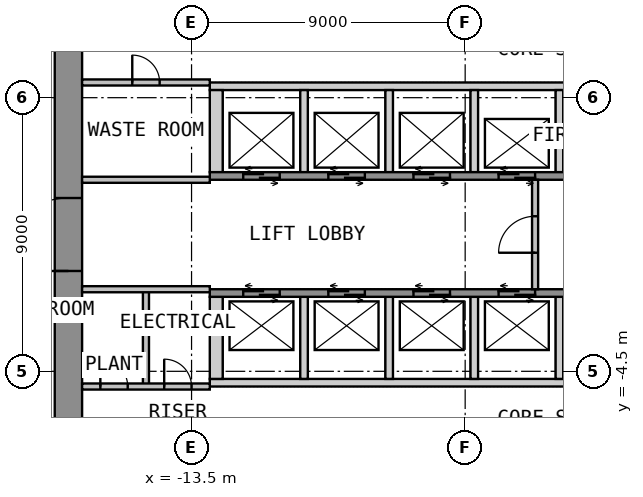
"""IFC4 building model, lengths in metres.
Left out: names, types, materials, properties, quantities, classifications, styles, units other than length and angle.
Written with IfcOpenShell. Run it as: python <this file> out.ifc"""

import sys

from ifc_helpers import new_model, si_unit, direction, frame, frame_2d, origin, place, context, subcontext, project, spatial, polyline, rectangle, outline, extrude, element, fill, save


model = new_model("IFC4")
c1 = context("Model", 3, precision=1e-05, world=origin(), true_north=direction((0.0, 1.0)))
c2 = subcontext(c1, "Body", "Model", "MODEL_VIEW")
j1 = project(units=[si_unit("LENGTHUNIT", "METRE"), si_unit("PLANEANGLEUNIT", "RADIAN")], contexts=[c1])
p1 = place(None, origin())
s1 = spatial("IfcSite", under=j1, at=p1, CompositionType="ELEMENT")
p2 = place(p1, origin())
s2 = spatial("IfcBuilding", under=s1, at=p2, CompositionType="ELEMENT")
p3 = place(p2, origin())
s3 = spatial("IfcBuildingStorey", under=s2, at=p3, CompositionType="ELEMENT", Elevation=0.0)
p4 = place(p3, frame((-17.55, -12.6, 0.0), z_axis=(0.0, 0.0, 1.0), x_axis=(0.0, 1.0, 0.0)))
e1 = element("IfcWall", 1, at=p4, inside=s3, PredefinedType="SHEAR", context=c2, shape_type="SweptSolid", body=[
    extrude(rectangle(XDim=25.2, YDim=0.9, at=frame_2d((12.6, 0.0))), origin(), (0.0, 0.0, 1.0), 5.6),
])
p5 = place(p4, frame((11.4, 0.0, 0.0)))
e2 = element("IfcOpeningElement", 2, at=p5, cuts=e1, PredefinedType="OPENING", context=c2, shape_type="SweptSolid", body=[
    extrude(rectangle(XDim=2.4, YDim=2.1, at=frame_2d((1.2, 1.05))), frame((0.0, 0.46, 0.0), z_axis=(0.0, -1.0, 0.0), x_axis=(1.0, 0.0, 0.0)), (0.0, 0.0, 1.0), 0.92),
])
p6 = place(p3, origin())
e3 = element("IfcWall", 3, at=p6, inside=s3, PredefinedType="SHEAR", context=c2, shape_type="SweptSolid", body=[
    extrude(outline(polyline([(-12.9, 4.75), (12.9, 4.75), (12.9, 5.0), (-12.9, 5.0), (-12.9, 4.75)])), origin(), (0.0, 0.0, 1.0), 5.6),
])
p7 = place(p3, origin())
e4 = element("IfcWall", 4, at=p7, inside=s3, PredefinedType="SHEAR", context=c2, shape_type="SweptSolid", body=[
    extrude(outline(polyline([(-12.9, 2.05), (-12.475, 2.05), (-12.475, 4.75), (-12.9, 4.75), (-12.9, 2.05)])), origin(), (0.0, 0.0, 1.0), 5.6),
])
p8 = place(p3, origin())
e5 = element("IfcWall", 5, at=p8, inside=s3, PredefinedType="SHEAR", context=c2, shape_type="SweptSolid", body=[
    extrude(outline(polyline([(-9.925, 2.05), (-9.675, 2.05), (-9.675, 4.75), (-9.925, 4.75), (-9.925, 2.05)])), origin(), (0.0, 0.0, 1.0), 5.6),
])
p9 = place(p3, origin())
e6 = element("IfcWall", 6, at=p9, inside=s3, PredefinedType="SHEAR", context=c2, shape_type="SweptSolid", body=[
    extrude(outline(polyline([(-7.125, 2.05), (-6.875, 2.05), (-6.875, 4.75), (-7.125, 4.75), (-7.125, 2.05)])), origin(), (0.0, 0.0, 1.0), 5.6),
])
p10 = place(p3, origin())
e7 = element("IfcWall", 7, at=p10, inside=s3, PredefinedType="SHEAR", context=c2, shape_type="SweptSolid", body=[
    extrude(outline(polyline([(-4.325, 2.05), (-4.075, 2.05), (-4.075, 4.75), (-4.325, 4.75), (-4.325, 2.05)])), origin(), (0.0, 0.0, 1.0), 5.6),
])
p11 = place(p3, origin())
e8 = element("IfcWall", 8, at=p11, inside=s3, PredefinedType="SHEAR", context=c2, shape_type="SweptSolid", body=[
    extrude(outline(polyline([(-1.525, 2.05), (-1.275, 2.05), (-1.275, 4.75), (-1.525, 4.75), (-1.525, 2.05)])), origin(), (0.0, 0.0, 1.0), 5.6),
])
p12 = place(p3, frame((-12.9, 1.925, 0.0), z_axis=(0.0, 0.0, 1.0), x_axis=(1.0, 0.0, 0.0)))
e9 = element("IfcWall", 9, at=p12, inside=s3, PredefinedType="SHEAR", context=c2, shape_type="SweptSolid", body=[
    extrude(rectangle(XDim=25.8, YDim=0.25, at=frame_2d((12.9, 0.0))), origin(), (0.0, 0.0, 1.0), 5.6),
])
p13 = place(p12, frame((1.1, 0.0, 0.0)))
e10 = element("IfcOpeningElement", 10, at=p13, cuts=e9, PredefinedType="OPENING", context=c2, shape_type="SweptSolid", body=[
    extrude(rectangle(XDim=1.2, YDim=2.1, at=frame_2d((0.6, 1.05))), frame((0.0, 0.135, 0.0), z_axis=(0.0, -1.0, 0.0), x_axis=(1.0, 0.0, 0.0)), (0.0, 0.0, 1.0), 0.27),
])
p14 = place(p12, frame((3.9, 0.0, 0.0)))
e11 = element("IfcOpeningElement", 11, at=p14, cuts=e9, PredefinedType="OPENING", context=c2, shape_type="SweptSolid", body=[
    extrude(rectangle(XDim=1.2, YDim=2.1, at=frame_2d((0.6, 1.05))), frame((0.0, 0.135, 0.0), z_axis=(0.0, -1.0, 0.0), x_axis=(1.0, 0.0, 0.0)), (0.0, 0.0, 1.0), 0.27),
])
p15 = place(p12, frame((6.7, 0.0, 0.0)))
e12 = element("IfcOpeningElement", 12, at=p15, cuts=e9, PredefinedType="OPENING", context=c2, shape_type="SweptSolid", body=[
    extrude(rectangle(XDim=1.2, YDim=2.1, at=frame_2d((0.6, 1.05))), frame((0.0, 0.135, 0.0), z_axis=(0.0, -1.0, 0.0), x_axis=(1.0, 0.0, 0.0)), (0.0, 0.0, 1.0), 0.27),
])
p16 = place(p12, frame((9.5, 0.0, 0.0)))
e13 = element("IfcOpeningElement", 13, at=p16, cuts=e9, PredefinedType="OPENING", context=c2, shape_type="SweptSolid", body=[
    extrude(rectangle(XDim=1.2, YDim=2.1, at=frame_2d((0.6, 1.05))), frame((0.0, 0.135, 0.0), z_axis=(0.0, -1.0, 0.0), x_axis=(1.0, 0.0, 0.0)), (0.0, 0.0, 1.0), 0.27),
])
p17 = place(p12, frame((12.3, 0.0, 0.0)))
e14 = element("IfcOpeningElement", 14, at=p17, cuts=e9, PredefinedType="OPENING", context=c2, shape_type="SweptSolid", body=[
    extrude(rectangle(XDim=1.2, YDim=2.1, at=frame_2d((0.6, 1.05))), frame((0.0, 0.135, 0.0), z_axis=(0.0, -1.0, 0.0), x_axis=(1.0, 0.0, 0.0)), (0.0, 0.0, 1.0), 0.27),
])
p18 = place(p12, frame((15.1, 0.0, 0.0)))
e15 = element("IfcOpeningElement", 15, at=p18, cuts=e9, PredefinedType="OPENING", context=c2, shape_type="SweptSolid", body=[
    extrude(rectangle(XDim=1.2, YDim=2.1, at=frame_2d((0.6, 1.05))), frame((0.0, 0.135, 0.0), z_axis=(0.0, -1.0, 0.0), x_axis=(1.0, 0.0, 0.0)), (0.0, 0.0, 1.0), 0.27),
])
p19 = place(p12, frame((17.9, 0.0, 0.0)))
e16 = element("IfcOpeningElement", 16, at=p19, cuts=e9, PredefinedType="OPENING", context=c2, shape_type="SweptSolid", body=[
    extrude(rectangle(XDim=1.2, YDim=2.1, at=frame_2d((0.6, 1.05))), frame((0.0, 0.135, 0.0), z_axis=(0.0, -1.0, 0.0), x_axis=(1.0, 0.0, 0.0)), (0.0, 0.0, 1.0), 0.27),
])
p20 = place(p12, frame((20.7, 0.0, 0.0)))
e17 = element("IfcOpeningElement", 17, at=p20, cuts=e9, PredefinedType="OPENING", context=c2, shape_type="SweptSolid", body=[
    extrude(rectangle(XDim=1.2, YDim=2.1, at=frame_2d((0.6, 1.05))), frame((0.0, 0.135, 0.0), z_axis=(0.0, -1.0, 0.0), x_axis=(1.0, 0.0, 0.0)), (0.0, 0.0, 1.0), 0.27),
])
p21 = place(p12, frame((23.5, 0.0, 0.0)))
e18 = element("IfcOpeningElement", 18, at=p21, cuts=e9, PredefinedType="OPENING", context=c2, shape_type="SweptSolid", body=[
    extrude(rectangle(XDim=1.2, YDim=2.1, at=frame_2d((0.6, 1.05))), frame((0.0, 0.135, 0.0), z_axis=(0.0, -1.0, 0.0), x_axis=(1.0, 0.0, 0.0)), (0.0, 0.0, 1.0), 0.27),
])
p22 = place(p3, origin())
e19 = element("IfcWall", 19, at=p22, inside=s3, PredefinedType="SHEAR", context=c2, shape_type="SweptSolid", body=[
    extrude(outline(polyline([(-12.9, -5.0), (12.9, -5.0), (12.9, -4.75), (-12.9, -4.75), (-12.9, -5.0)])), origin(), (0.0, 0.0, 1.0), 5.6),
])
p23 = place(p3, origin())
e20 = element("IfcWall", 20, at=p23, inside=s3, PredefinedType="SHEAR", context=c2, shape_type="SweptSolid", body=[
    extrude(outline(polyline([(-12.9, -4.75), (-12.475, -4.75), (-12.475, -2.05), (-12.9, -2.05), (-12.9, -4.75)])), origin(), (0.0, 0.0, 1.0), 5.6),
])
p24 = place(p3, origin())
e21 = element("IfcWall", 21, at=p24, inside=s3, PredefinedType="SHEAR", context=c2, shape_type="SweptSolid", body=[
    extrude(outline(polyline([(-9.925, -4.75), (-9.675, -4.75), (-9.675, -2.05), (-9.925, -2.05), (-9.925, -4.75)])), origin(), (0.0, 0.0, 1.0), 5.6),
])
p25 = place(p3, origin())
e22 = element("IfcWall", 22, at=p25, inside=s3, PredefinedType="SHEAR", context=c2, shape_type="SweptSolid", body=[
    extrude(outline(polyline([(-7.125, -4.75), (-6.875, -4.75), (-6.875, -2.05), (-7.125, -2.05), (-7.125, -4.75)])), origin(), (0.0, 0.0, 1.0), 5.6),
])
p26 = place(p3, origin())
e23 = element("IfcWall", 23, at=p26, inside=s3, PredefinedType="SHEAR", context=c2, shape_type="SweptSolid", body=[
    extrude(outline(polyline([(-4.325, -4.75), (-4.075, -4.75), (-4.075, -2.05), (-4.325, -2.05), (-4.325, -4.75)])), origin(), (0.0, 0.0, 1.0), 5.6),
])
p27 = place(p3, origin())
e24 = element("IfcWall", 24, at=p27, inside=s3, PredefinedType="SHEAR", context=c2, shape_type="SweptSolid", body=[
    extrude(outline(polyline([(-1.525, -4.75), (-1.275, -4.75), (-1.275, -2.05), (-1.525, -2.05), (-1.525, -4.75)])), origin(), (0.0, 0.0, 1.0), 5.6),
])
p28 = place(p3, frame((-12.9, -1.925, 0.0), z_axis=(0.0, 0.0, 1.0), x_axis=(1.0, 0.0, 0.0)))
e25 = element("IfcWall", 25, at=p28, inside=s3, PredefinedType="SHEAR", context=c2, shape_type="SweptSolid", body=[
    extrude(rectangle(XDim=25.8, YDim=0.25, at=frame_2d((12.9, 0.0))), origin(), (0.0, 0.0, 1.0), 5.6),
])
p29 = place(p28, frame((1.1, 0.0, 0.0)))
e26 = element("IfcOpeningElement", 26, at=p29, cuts=e25, PredefinedType="OPENING", context=c2, shape_type="SweptSolid", body=[
    extrude(rectangle(XDim=1.2, YDim=2.1, at=frame_2d((0.6, 1.05))), frame((0.0, 0.135, 0.0), z_axis=(0.0, -1.0, 0.0), x_axis=(1.0, 0.0, 0.0)), (0.0, 0.0, 1.0), 0.27),
])
p30 = place(p28, frame((3.9, 0.0, 0.0)))
e27 = element("IfcOpeningElement", 27, at=p30, cuts=e25, PredefinedType="OPENING", context=c2, shape_type="SweptSolid", body=[
    extrude(rectangle(XDim=1.2, YDim=2.1, at=frame_2d((0.6, 1.05))), frame((0.0, 0.135, 0.0), z_axis=(0.0, -1.0, 0.0), x_axis=(1.0, 0.0, 0.0)), (0.0, 0.0, 1.0), 0.27),
])
p31 = place(p28, frame((6.7, 0.0, 0.0)))
e28 = element("IfcOpeningElement", 28, at=p31, cuts=e25, PredefinedType="OPENING", context=c2, shape_type="SweptSolid", body=[
    extrude(rectangle(XDim=1.2, YDim=2.1, at=frame_2d((0.6, 1.05))), frame((0.0, 0.135, 0.0), z_axis=(0.0, -1.0, 0.0), x_axis=(1.0, 0.0, 0.0)), (0.0, 0.0, 1.0), 0.27),
])
p32 = place(p28, frame((9.5, 0.0, 0.0)))
e29 = element("IfcOpeningElement", 29, at=p32, cuts=e25, PredefinedType="OPENING", context=c2, shape_type="SweptSolid", body=[
    extrude(rectangle(XDim=1.2, YDim=2.1, at=frame_2d((0.6, 1.05))), frame((0.0, 0.135, 0.0), z_axis=(0.0, -1.0, 0.0), x_axis=(1.0, 0.0, 0.0)), (0.0, 0.0, 1.0), 0.27),
])
p33 = place(p28, frame((12.3, 0.0, 0.0)))
e30 = element("IfcOpeningElement", 30, at=p33, cuts=e25, PredefinedType="OPENING", context=c2, shape_type="SweptSolid", body=[
    extrude(rectangle(XDim=1.2, YDim=2.1, at=frame_2d((0.6, 1.05))), frame((0.0, 0.135, 0.0), z_axis=(0.0, -1.0, 0.0), x_axis=(1.0, 0.0, 0.0)), (0.0, 0.0, 1.0), 0.27),
])
p34 = place(p28, frame((15.1, 0.0, 0.0)))
e31 = element("IfcOpeningElement", 31, at=p34, cuts=e25, PredefinedType="OPENING", context=c2, shape_type="SweptSolid", body=[
    extrude(rectangle(XDim=1.2, YDim=2.1, at=frame_2d((0.6, 1.05))), frame((0.0, 0.135, 0.0), z_axis=(0.0, -1.0, 0.0), x_axis=(1.0, 0.0, 0.0)), (0.0, 0.0, 1.0), 0.27),
])
p35 = place(p28, frame((17.9, 0.0, 0.0)))
e32 = element("IfcOpeningElement", 32, at=p35, cuts=e25, PredefinedType="OPENING", context=c2, shape_type="SweptSolid", body=[
    extrude(rectangle(XDim=1.2, YDim=2.1, at=frame_2d((0.6, 1.05))), frame((0.0, 0.135, 0.0), z_axis=(0.0, -1.0, 0.0), x_axis=(1.0, 0.0, 0.0)), (0.0, 0.0, 1.0), 0.27),
])
p36 = place(p28, frame((20.7, 0.0, 0.0)))
e33 = element("IfcOpeningElement", 33, at=p36, cuts=e25, PredefinedType="OPENING", context=c2, shape_type="SweptSolid", body=[
    extrude(rectangle(XDim=1.2, YDim=2.1, at=frame_2d((0.6, 1.05))), frame((0.0, 0.135, 0.0), z_axis=(0.0, -1.0, 0.0), x_axis=(1.0, 0.0, 0.0)), (0.0, 0.0, 1.0), 0.27),
])
p37 = place(p28, frame((23.5, 0.0, 0.0)))
e34 = element("IfcOpeningElement", 34, at=p37, cuts=e25, PredefinedType="OPENING", context=c2, shape_type="SweptSolid", body=[
    extrude(rectangle(XDim=1.2, YDim=2.1, at=frame_2d((0.6, 1.05))), frame((0.0, 0.135, 0.0), z_axis=(0.0, -1.0, 0.0), x_axis=(1.0, 0.0, 0.0)), (0.0, 0.0, 1.0), 0.27),
])
p38 = place(p3, frame((-2.2, -1.8, 0.0), z_axis=(0.0, 0.0, 1.0), x_axis=(0.0, 1.0, 0.0)))
e35 = element("IfcWall", 35, at=p38, inside=s3, PredefinedType="PARTITIONING", context=c2, shape_type="SweptSolid", body=[
    extrude(rectangle(XDim=3.6, YDim=0.2, at=frame_2d((1.8, 0.0))), origin(), (0.0, 0.0, 1.0), 5.6),
])
p39 = place(p38, frame((1.2, 0.0, 0.0)))
e36 = element("IfcOpeningElement", 36, at=p39, cuts=e35, PredefinedType="OPENING", context=c2, shape_type="SweptSolid", body=[
    extrude(rectangle(XDim=1.2, YDim=2.1, at=frame_2d((0.6, 1.05))), frame((0.0, 0.11, 0.0), z_axis=(0.0, -1.0, 0.0), x_axis=(1.0, 0.0, 0.0)), (0.0, 0.0, 1.0), 0.22),
])
p40 = place(p3, frame((-17.1, 5.0, 0.0), z_axis=(0.0, 0.0, 1.0), x_axis=(1.0, 0.0, 0.0)))
e37 = element("IfcWall", 37, at=p40, inside=s3, PredefinedType="PARTITIONING", context=c2, shape_type="SweptSolid", body=[
    extrude(rectangle(XDim=4.2, YDim=0.2, at=frame_2d((2.1, 0.0))), origin(), (0.0, 0.0, 1.0), 5.6),
])
p41 = place(p40, frame((1.65, 0.0, 0.0)))
e38 = element("IfcOpeningElement", 38, at=p41, cuts=e37, PredefinedType="OPENING", context=c2, shape_type="SweptSolid", body=[
    extrude(rectangle(XDim=0.9, YDim=2.1, at=frame_2d((0.45, 1.05))), frame((0.0, 0.11, 0.0), z_axis=(0.0, -1.0, 0.0), x_axis=(1.0, 0.0, 0.0)), (0.0, 0.0, 1.0), 0.22),
])
p42 = place(p3, frame((-17.1, 1.8, 0.0), z_axis=(0.0, 0.0, 1.0), x_axis=(1.0, 0.0, 0.0)))
e39 = element("IfcWall", 39, at=p42, inside=s3, PredefinedType="PARTITIONING", context=c2, shape_type="SweptSolid", body=[
    extrude(rectangle(XDim=4.2, YDim=0.2, at=frame_2d((2.1, 0.0))), origin(), (0.0, 0.0, 1.0), 5.6),
])
p43 = place(p3, frame((-15.0, -5.0, 0.0), z_axis=(0.0, 0.0, 1.0), x_axis=(0.0, 1.0, 0.0)))
e40 = element("IfcWall", 40, at=p43, inside=s3, PredefinedType="PARTITIONING", context=c2, shape_type="SweptSolid", body=[
    extrude(rectangle(XDim=3.2, YDim=0.2, at=frame_2d((1.6, 0.0))), origin(), (0.0, 0.0, 1.0), 5.6),
])
p44 = place(p3, frame((-17.1, -5.0, 0.0), z_axis=(0.0, 0.0, 1.0), x_axis=(1.0, 0.0, 0.0)))
e41 = element("IfcWall", 41, at=p44, inside=s3, PredefinedType="PARTITIONING", context=c2, shape_type="SweptSolid", body=[
    extrude(rectangle(XDim=4.2, YDim=0.2, at=frame_2d((2.1, 0.0))), origin(), (0.0, 0.0, 1.0), 5.6),
])
p45 = place(p44, frame((0.6, 0.0, 0.0)))
e42 = element("IfcOpeningElement", 42, at=p45, cuts=e41, PredefinedType="OPENING", context=c2, shape_type="SweptSolid", body=[
    extrude(rectangle(XDim=0.9, YDim=2.1, at=frame_2d((0.45, 1.05))), frame((0.0, 0.11, 0.0), z_axis=(0.0, -1.0, 0.0), x_axis=(1.0, 0.0, 0.0)), (0.0, 0.0, 1.0), 0.22),
])
p46 = place(p44, frame((2.7, 0.0, 0.0)))
e43 = element("IfcOpeningElement", 43, at=p46, cuts=e41, PredefinedType="OPENING", context=c2, shape_type="SweptSolid", body=[
    extrude(rectangle(XDim=0.9, YDim=2.1, at=frame_2d((0.45, 1.05))), frame((0.0, 0.11, 0.0), z_axis=(0.0, -1.0, 0.0), x_axis=(1.0, 0.0, 0.0)), (0.0, 0.0, 1.0), 0.22),
])
p47 = place(p3, frame((-17.1, -1.8, 0.0), z_axis=(0.0, 0.0, 1.0), x_axis=(1.0, 0.0, 0.0)))
e44 = element("IfcWall", 44, at=p47, inside=s3, PredefinedType="PARTITIONING", context=c2, shape_type="SweptSolid", body=[
    extrude(rectangle(XDim=4.2, YDim=0.2, at=frame_2d((2.1, 0.0))), origin(), (0.0, 0.0, 1.0), 5.6),
])
p48 = place(p5, origin())
e45 = element("IfcDoor", 45, at=p48, inside=s3, OperationType="DOUBLE_DOOR_DOUBLE_SWING", PredefinedType="DOOR", context=c2, shape_type="SweptSolid", body=[
    extrude(rectangle(XDim=2.4, YDim=2.1, at=frame_2d((1.2, 1.05))), frame((0.0, 0.025, 0.0), z_axis=(0.0, -1.0, 0.0), x_axis=(1.0, 0.0, 0.0)), (0.0, 0.0, 1.0), 0.05),
])
fill(e2, e45)
p49 = place(p13, origin())
e46 = element("IfcDoor", 46, at=p49, inside=s3, OperationType="DOUBLE_DOOR_SLIDING", PredefinedType="DOOR", context=c2, shape_type="SweptSolid", body=[
    extrude(rectangle(XDim=1.2, YDim=2.1, at=frame_2d((0.6, 1.05))), frame((0.0, 0.025, 0.0), z_axis=(0.0, -1.0, 0.0), x_axis=(1.0, 0.0, 0.0)), (0.0, 0.0, 1.0), 0.05),
])
fill(e10, e46)
p50 = place(p14, origin())
e47 = element("IfcDoor", 47, at=p50, inside=s3, OperationType="DOUBLE_DOOR_SLIDING", PredefinedType="DOOR", context=c2, shape_type="SweptSolid", body=[
    extrude(rectangle(XDim=1.2, YDim=2.1, at=frame_2d((0.6, 1.05))), frame((0.0, 0.025, 0.0), z_axis=(0.0, -1.0, 0.0), x_axis=(1.0, 0.0, 0.0)), (0.0, 0.0, 1.0), 0.05),
])
fill(e11, e47)
p51 = place(p15, origin())
e48 = element("IfcDoor", 48, at=p51, inside=s3, OperationType="DOUBLE_DOOR_SLIDING", PredefinedType="DOOR", context=c2, shape_type="SweptSolid", body=[
    extrude(rectangle(XDim=1.2, YDim=2.1, at=frame_2d((0.6, 1.05))), frame((0.0, 0.025, 0.0), z_axis=(0.0, -1.0, 0.0), x_axis=(1.0, 0.0, 0.0)), (0.0, 0.0, 1.0), 0.05),
])
fill(e12, e48)
p52 = place(p16, origin())
e49 = element("IfcDoor", 49, at=p52, inside=s3, OperationType="DOUBLE_DOOR_SLIDING", PredefinedType="DOOR", context=c2, shape_type="SweptSolid", body=[
    extrude(rectangle(XDim=1.2, YDim=2.1, at=frame_2d((0.6, 1.05))), frame((0.0, 0.025, 0.0), z_axis=(0.0, -1.0, 0.0), x_axis=(1.0, 0.0, 0.0)), (0.0, 0.0, 1.0), 0.05),
])
fill(e13, e49)
p53 = place(p29, origin())
e50 = element("IfcDoor", 50, at=p53, inside=s3, OperationType="DOUBLE_DOOR_SLIDING", PredefinedType="DOOR", context=c2, shape_type="SweptSolid", body=[
    extrude(rectangle(XDim=1.2, YDim=2.1, at=frame_2d((0.6, 1.05))), frame((0.0, 0.025, 0.0), z_axis=(0.0, -1.0, 0.0), x_axis=(1.0, 0.0, 0.0)), (0.0, 0.0, 1.0), 0.05),
])
fill(e26, e50)
p54 = place(p30, origin())
e51 = element("IfcDoor", 51, at=p54, inside=s3, OperationType="DOUBLE_DOOR_SLIDING", PredefinedType="DOOR", context=c2, shape_type="SweptSolid", body=[
    extrude(rectangle(XDim=1.2, YDim=2.1, at=frame_2d((0.6, 1.05))), frame((0.0, 0.025, 0.0), z_axis=(0.0, -1.0, 0.0), x_axis=(1.0, 0.0, 0.0)), (0.0, 0.0, 1.0), 0.05),
])
fill(e27, e51)
p55 = place(p31, origin())
e52 = element("IfcDoor", 52, at=p55, inside=s3, OperationType="DOUBLE_DOOR_SLIDING", PredefinedType="DOOR", context=c2, shape_type="SweptSolid", body=[
    extrude(rectangle(XDim=1.2, YDim=2.1, at=frame_2d((0.6, 1.05))), frame((0.0, 0.025, 0.0), z_axis=(0.0, -1.0, 0.0), x_axis=(1.0, 0.0, 0.0)), (0.0, 0.0, 1.0), 0.05),
])
fill(e28, e52)
p56 = place(p32, origin())
e53 = element("IfcDoor", 53, at=p56, inside=s3, OperationType="DOUBLE_DOOR_SLIDING", PredefinedType="DOOR", context=c2, shape_type="SweptSolid", body=[
    extrude(rectangle(XDim=1.2, YDim=2.1, at=frame_2d((0.6, 1.05))), frame((0.0, 0.025, 0.0), z_axis=(0.0, -1.0, 0.0), x_axis=(1.0, 0.0, 0.0)), (0.0, 0.0, 1.0), 0.05),
])
fill(e29, e53)
p57 = place(p39, origin())
e54 = element("IfcDoor", 54, at=p57, inside=s3, OperationType="SINGLE_SWING_LEFT", PredefinedType="DOOR", context=c2, shape_type="SweptSolid", body=[
    extrude(rectangle(XDim=1.2, YDim=2.1, at=frame_2d((0.6, 1.05))), frame((0.0, 0.025, 0.0), z_axis=(0.0, -1.0, 0.0), x_axis=(1.0, 0.0, 0.0)), (0.0, 0.0, 1.0), 0.05),
])
fill(e36, e54)
p58 = place(p41, origin())
e55 = element("IfcDoor", 55, at=p58, inside=s3, OperationType="SINGLE_SWING_LEFT", PredefinedType="DOOR", context=c2, shape_type="SweptSolid", body=[
    extrude(rectangle(XDim=0.9, YDim=2.1, at=frame_2d((0.45, 1.05))), frame((0.0, 0.025, 0.0), z_axis=(0.0, -1.0, 0.0), x_axis=(1.0, 0.0, 0.0)), (0.0, 0.0, 1.0), 0.05),
])
fill(e38, e55)
p59 = place(p45, origin())
e56 = element("IfcDoor", 56, at=p59, inside=s3, OperationType="SINGLE_SWING_LEFT", PredefinedType="DOOR", context=c2, shape_type="SweptSolid", body=[
    extrude(rectangle(XDim=0.9, YDim=2.1, at=frame_2d((0.45, 1.05))), frame((0.0, 0.025, 0.0), z_axis=(0.0, -1.0, 0.0), x_axis=(1.0, 0.0, 0.0)), (0.0, 0.0, 1.0), 0.05),
])
fill(e42, e56)
p60 = place(p46, origin())
e57 = element("IfcDoor", 57, at=p60, inside=s3, OperationType="SINGLE_SWING_LEFT", PredefinedType="DOOR", context=c2, shape_type="SweptSolid", body=[
    extrude(rectangle(XDim=0.9, YDim=2.1, at=frame_2d((0.45, 1.05))), frame((0.0, 0.025, 0.0), z_axis=(0.0, -1.0, 0.0), x_axis=(1.0, 0.0, 0.0)), (0.0, 0.0, 1.0), 0.05),
])
fill(e43, e57)
save(model, sys.argv[1])
